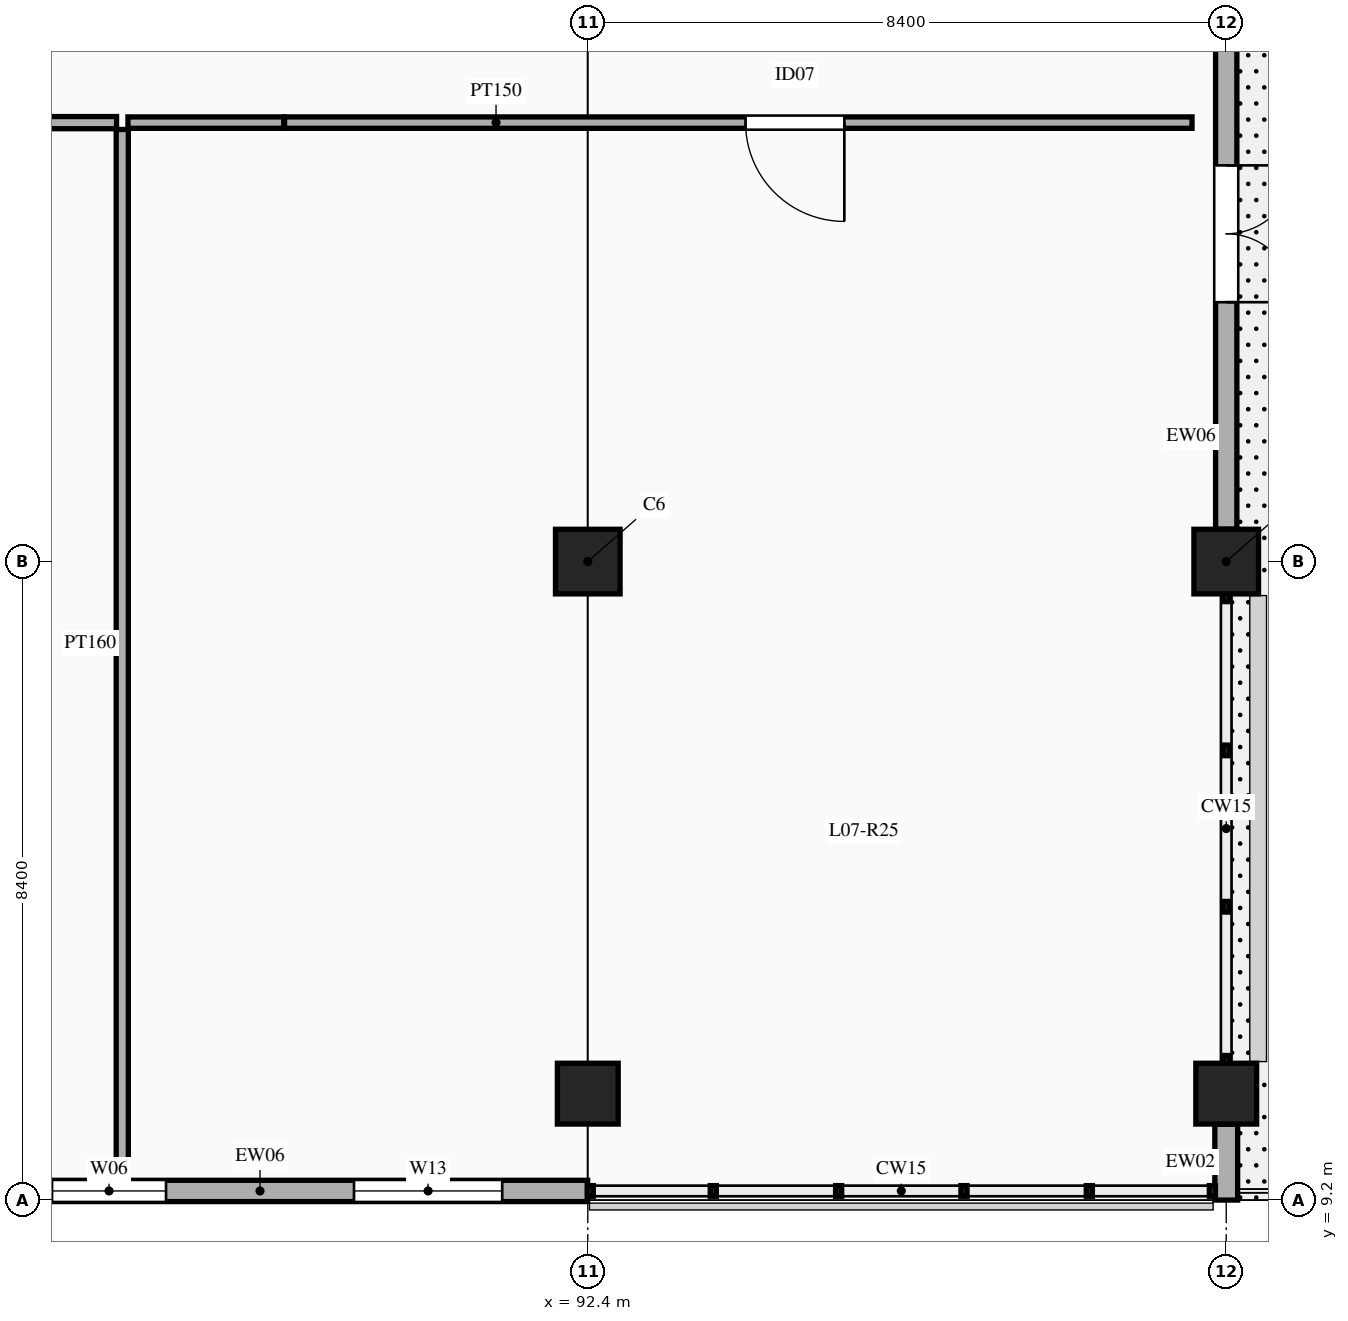
"""IFC4 building model, lengths in metres.
Left out: names, types, materials, properties, quantities, classifications, styles, units other than length and angle.
Written with IfcOpenShell. Run it as: python <this file> out.ifc"""

import sys

from ifc_helpers import new_model, si_unit, direction, frame, frame_2d, origin, origin_2d, place, context, subcontext, project, spatial, rectangle, extrude, element, fill, save


model = new_model("IFC4")
c1 = context("Model", 3, precision=1e-05, world=origin(), true_north=direction((0.0, 1.0)))
c2 = subcontext(c1, "Body", "Model", "MODEL_VIEW")
j1 = project(units=[si_unit("LENGTHUNIT", "METRE"), si_unit("PLANEANGLEUNIT", "RADIAN")], contexts=[c1])
p1 = place(None, origin())
s1 = spatial("IfcSite", under=j1, at=p1, CompositionType="ELEMENT")
p2 = place(p1, origin())
s2 = spatial("IfcBuilding", under=s1, at=p2, CompositionType="ELEMENT")
p3 = place(p2, frame((0.0, 0.0, 33.0)))
s3 = spatial("IfcBuildingStorey", under=s2, at=p3, CompositionType="ELEMENT", Elevation=33.0)
p4 = place(p3, frame((92.4, 10.6, 0.0), z_axis=(0.0, 0.0, 1.0), x_axis=(1.0, 0.0, 0.0)))
e1 = element("IfcColumn", 1, at=p4, inside=s3, PredefinedType="COLUMN", context=c2, shape_type="SweptSolid", body=[
    extrude(rectangle(XDim=0.8, YDim=0.8, at=origin_2d()), origin(), (0.0, 0.0, 1.0), 4.5),
])
p5 = place(p3, frame((92.4, 17.6, 0.0), z_axis=(0.0, 0.0, 1.0), x_axis=(1.0, 0.0, 0.0)))
e2 = element("IfcColumn", 2, at=p5, inside=s3, PredefinedType="COLUMN", context=c2, shape_type="SweptSolid", body=[
    extrude(rectangle(XDim=0.85, YDim=0.85, at=origin_2d()), origin(), (0.0, 0.0, 1.0), 4.5),
])
p6 = place(p3, frame((100.8, 10.6, 0.0), z_axis=(0.0, 0.0, 1.0), x_axis=(1.0, 0.0, 0.0)))
e3 = element("IfcColumn", 3, at=p6, inside=s3, PredefinedType="COLUMN", context=c2, shape_type="SweptSolid", body=[
    extrude(rectangle(XDim=0.8, YDim=0.8, at=origin_2d()), origin(), (0.0, 0.0, 1.0), 4.5),
])
p7 = place(p3, frame((100.8, 17.6, 0.0), z_axis=(0.0, 0.0, 1.0), x_axis=(1.0, 0.0, 0.0)))
e4 = element("IfcColumn", 4, at=p7, inside=s3, PredefinedType="COLUMN", context=c2, shape_type="SweptSolid", body=[
    extrude(rectangle(XDim=0.85, YDim=0.85, at=origin_2d()), origin(), (0.0, 0.0, 1.0), 4.5),
])
p8 = place(p3, frame((100.8, 9.2, 0.0), z_axis=(0.0, 0.0, 1.0), x_axis=(0.0, 1.0, 0.0)))
e5 = element("IfcWall", 5, at=p8, inside=s3, PredefinedType="SOLIDWALL", context=c2, shape_type="SweptSolid", body=[
    extrude(rectangle(XDim=0.998, YDim=0.3, at=frame_2d((0.499, 0.0))), origin(), (0.0, 0.0, 1.0), 3.55),
])
p9 = place(p3, frame((84.002, 9.32, 0.0), z_axis=(0.0, 0.0, 1.0), x_axis=(1.0, 0.0, 0.0)))
e6 = element("IfcWall", 6, at=p9, inside=s3, PredefinedType="ELEMENTEDWALL", context=c2, shape_type="SweptSolid", body=[
    extrude(rectangle(XDim=8.396, YDim=0.28, at=frame_2d((4.198, 0.0))), origin(), (0.0, 0.0, 1.0), 3.55),
])
p10 = place(p9, frame((1.349, 0.0, 0.9)))
e7 = element("IfcOpeningElement", 7, at=p10, cuts=e6, PredefinedType="OPENING", context=c2, shape_type="SweptSolid", body=[
    extrude(rectangle(XDim=1.5, YDim=2.0, at=frame_2d((0.75, 1.0))), frame((0.0, 0.15, 0.0), z_axis=(0.0, -1.0, 0.0), x_axis=(1.0, 0.0, 0.0)), (0.0, 0.0, 1.0), 0.3),
])
p11 = place(p9, frame((5.322, 0.0, 0.9)))
e8 = element("IfcOpeningElement", 8, at=p11, cuts=e6, PredefinedType="OPENING", context=c2, shape_type="SweptSolid", body=[
    extrude(rectangle(XDim=1.95, YDim=2.0, at=frame_2d((0.975, 1.0))), frame((0.0, 0.15, 0.0), z_axis=(0.0, -1.0, 0.0), x_axis=(1.0, 0.0, 0.0)), (0.0, 0.0, 1.0), 0.3),
])
p12 = place(p3, frame((100.8, 18.027, 0.0), z_axis=(0.0, 0.0, 1.0), x_axis=(0.0, 1.0, 0.0)))
e9 = element("IfcWall", 9, at=p12, inside=s3, PredefinedType="ELEMENTEDWALL", context=c2, shape_type="SweptSolid", body=[
    extrude(rectangle(XDim=7.771, YDim=0.28, at=frame_2d((3.885, 0.0))), origin(), (0.0, 0.0, 1.0), 3.55),
])
p13 = place(p12, frame((2.986, 0.0, 0.0)))
e10 = element("IfcOpeningElement", 10, at=p13, cuts=e9, PredefinedType="OPENING", context=c2, shape_type="SweptSolid", body=[
    extrude(rectangle(XDim=1.8, YDim=2.2, at=frame_2d((0.9, 1.1))), frame((0.0, 0.15, 0.0), z_axis=(0.0, -1.0, 0.0), x_axis=(1.0, 0.0, 0.0)), (0.0, 0.0, 1.0), 0.3),
])
p14 = place(p3, frame((84.51, 23.375, 0.0), z_axis=(0.0, 0.0, 1.0), x_axis=(1.0, 0.0, 0.0)))
e11 = element("IfcWall", 11, at=p14, inside=s3, PredefinedType="PARTITIONING", context=c2, shape_type="SweptSolid", body=[
    extrude(rectangle(XDim=1.69, YDim=0.16, at=frame_2d((0.845, 0.0))), origin(), (0.0, 0.0, 1.0), 3.45),
])
p15 = place(p3, frame((86.35, 23.375, 0.0), z_axis=(0.0, 0.0, 1.0), x_axis=(1.0, 0.0, 0.0)))
e12 = element("IfcWall", 12, at=p15, inside=s3, PredefinedType="PARTITIONING", context=c2, shape_type="SweptSolid", body=[
    extrude(rectangle(XDim=2.05, YDim=0.15, at=frame_2d((1.025, 0.0))), origin(), (0.0, 0.0, 1.0), 3.45),
])
p16 = place(p3, frame((88.41, 23.375, 0.0), z_axis=(0.0, 0.0, 1.0), x_axis=(1.0, 0.0, 0.0)))
e13 = element("IfcWall", 13, at=p16, inside=s3, PredefinedType="PARTITIONING", context=c2, shape_type="SweptSolid", body=[
    extrude(rectangle(XDim=11.94, YDim=0.15, at=frame_2d((5.97, 0.0))), origin(), (0.0, 0.0, 1.0), 3.45),
])
p17 = place(p16, frame((6.066, 0.0, 0.0)))
e14 = element("IfcOpeningElement", 14, at=p17, cuts=e13, PredefinedType="OPENING", context=c2, shape_type="SweptSolid", body=[
    extrude(rectangle(XDim=1.3, YDim=2.25, at=frame_2d((0.65, 1.125))), frame((0.0, 0.085, 0.0), z_axis=(0.0, -1.0, 0.0), x_axis=(1.0, 0.0, 0.0)), (0.0, 0.0, 1.0), 0.17),
])
p18 = place(p3, frame((86.275, 9.65, 0.0), z_axis=(0.0, 0.0, 1.0), x_axis=(0.0, 1.0, 0.0)))
e15 = element("IfcWall", 15, at=p18, inside=s3, PredefinedType="PARTITIONING", context=c2, shape_type="SweptSolid", body=[
    extrude(rectangle(XDim=13.635, YDim=0.16, at=frame_2d((6.817, 0.0))), origin(), (0.0, 0.0, 1.0), 3.45),
])
p19 = place(p10, origin())
e16 = element("IfcWindow", 16, at=p19, inside=s3, PartitioningType="DOUBLE_PANEL_VERTICAL", PredefinedType="WINDOW", context=c2, shape_type="SweptSolid", body=[
    extrude(rectangle(XDim=1.5, YDim=2.0, at=frame_2d((0.75, 1.0))), frame((0.0, 0.03, 0.0), z_axis=(0.0, -1.0, 0.0), x_axis=(1.0, 0.0, 0.0)), (0.0, 0.0, 1.0), 0.06),
])
fill(e7, e16)
p20 = place(p11, origin())
e17 = element("IfcWindow", 17, at=p20, inside=s3, PartitioningType="TRIPLE_PANEL_VERTICAL", PredefinedType="WINDOW", context=c2, shape_type="SweptSolid", body=[
    extrude(rectangle(XDim=1.95, YDim=2.0, at=frame_2d((0.975, 1.0))), frame((0.0, 0.03, 0.0), z_axis=(0.0, -1.0, 0.0), x_axis=(1.0, 0.0, 0.0)), (0.0, 0.0, 1.0), 0.06),
])
fill(e8, e17)
p21 = place(p13, frame((1.8, 0.0, 0.0), z_axis=(0.0, 0.0, 1.0), x_axis=(-1.0, 0.0, 0.0)))
e18 = element("IfcDoor", 18, at=p21, inside=s3, OperationType="DOUBLE_DOOR_SINGLE_SWING", PredefinedType="DOOR", context=c2, shape_type="SweptSolid", body=[
    extrude(rectangle(XDim=1.8, YDim=2.2, at=frame_2d((0.9, 1.1))), frame((0.0, 0.025, 0.0), z_axis=(0.0, -1.0, 0.0), x_axis=(1.0, 0.0, 0.0)), (0.0, 0.0, 1.0), 0.05),
])
fill(e10, e18)
p22 = place(p17, frame((1.3, 0.0, 0.0), z_axis=(0.0, 0.0, 1.0), x_axis=(-1.0, 0.0, 0.0)))
e19 = element("IfcDoor", 19, at=p22, inside=s3, OperationType="SINGLE_SWING_LEFT", PredefinedType="DOOR", context=c2, shape_type="SweptSolid", body=[
    extrude(rectangle(XDim=1.3, YDim=2.25, at=frame_2d((0.65, 1.125))), frame((0.0, 0.025, 0.0), z_axis=(0.0, -1.0, 0.0), x_axis=(1.0, 0.0, 0.0)), (0.0, 0.0, 1.0), 0.05),
])
fill(e14, e19)
save(model, sys.argv[1])
